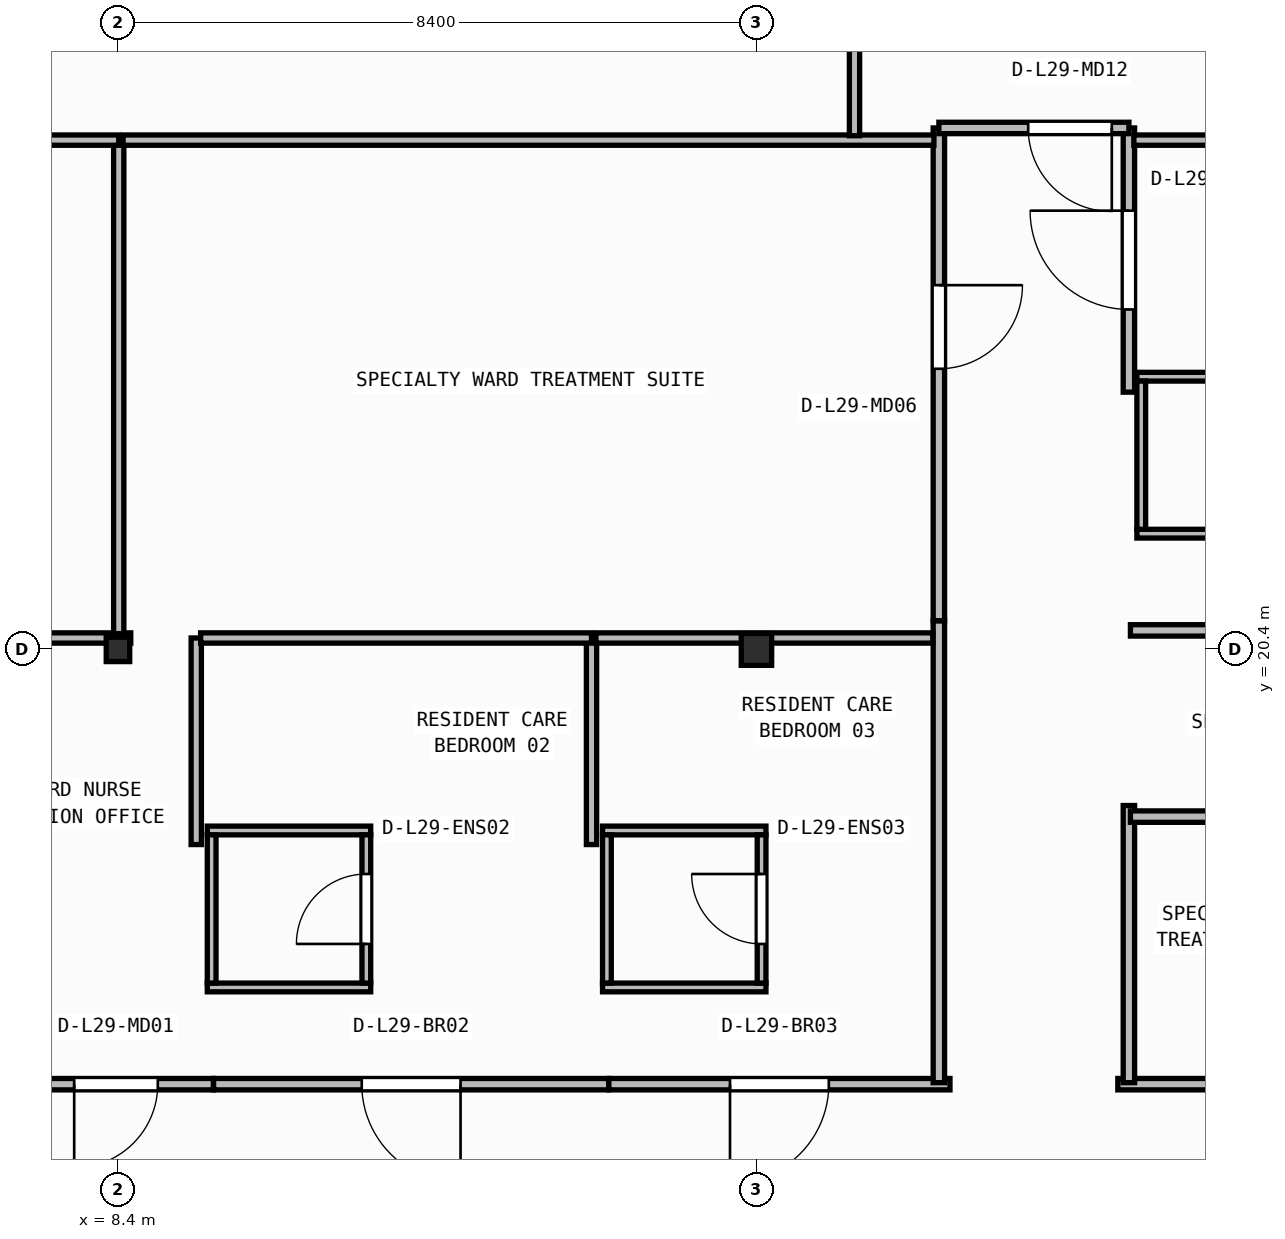
"""IFC4 building model, lengths in metres.
Left out: names, types, materials, properties, quantities, classifications, styles, units other than length and angle.
Written with IfcOpenShell. Run it as: python <this file> out.ifc"""

import sys

from ifc_helpers import new_model, si_unit, direction, frame, frame_2d, origin, origin_2d, place, context, subcontext, project, spatial, rectangle, i_section, extrude, element, fill, save


model = new_model("IFC4")
c1 = context("Model", 3, precision=1e-05, world=origin(), true_north=direction((0.0, 1.0)))
c2 = subcontext(c1, "Body", "Model", "MODEL_VIEW")
j1 = project(units=[si_unit("LENGTHUNIT", "METRE"), si_unit("PLANEANGLEUNIT", "RADIAN")], contexts=[c1])
p1 = place(None, origin())
s1 = spatial("IfcSite", under=j1, at=p1, CompositionType="ELEMENT")
p2 = place(p1, origin())
s2 = spatial("IfcBuilding", under=s1, at=p2, CompositionType="ELEMENT")
p3 = place(p2, frame((0.0, 0.0, 119.15)))
s3 = spatial("IfcBuildingStorey", under=s2, at=p3, CompositionType="ELEMENT", Elevation=119.15)
p4 = place(p3, frame((8.4, 20.4, 0.0), z_axis=(0.0, 0.0, 1.0), x_axis=(1.0, 0.0, 0.0)))
e1 = element("IfcColumn", 1, at=p4, inside=s3, PredefinedType="COLUMN", context=c2, shape_type="SweptSolid", body=[
    extrude(i_section(OverallWidth=0.309, OverallDepth=0.321, WebThickness=0.014, FlangeThickness=0.022, FilletRadius=0.017, at=origin_2d()), origin(), (0.0, 0.0, 1.0), 3.95),
])
p5 = place(p3, frame((16.8, 20.4, 0.0), z_axis=(0.0, 0.0, 1.0), x_axis=(1.0, 0.0, 0.0)))
e2 = element("IfcColumn", 2, at=p5, inside=s3, PredefinedType="COLUMN", context=c2, shape_type="SweptSolid", body=[
    extrude(i_section(OverallWidth=0.4, OverallDepth=0.42, WebThickness=0.025, FlangeThickness=0.04, at=origin_2d()), origin(), (0.0, 0.0, 1.0), 3.95),
])
for number, where, z_axis, x_axis in (
    (3, (9.575, 15.952, 0.0), (0.0, 0.0, 1.0), (1.0, 0.0, 0.0)),
    (4, (9.575, 18.018, 0.0), (0.0, 0.0, 1.0), (1.0, 0.0, 0.0)),
):
    element("IfcWall", number, at=place(p3, frame(where, z_axis=z_axis, x_axis=x_axis)), inside=s3, PredefinedType="PARTITIONING", context=c2, shape_type="SweptSolid", body=[
        extrude(rectangle(XDim=2.15, YDim=0.115, at=frame_2d((1.075, 0.0))), origin(), (0.0, 0.0, 1.0), 3.71),
    ])
p6 = place(p3, frame((9.633, 16.01, 0.0), z_axis=(0.0, 0.0, 1.0), x_axis=(0.0, 1.0, 0.0)))
e5 = element("IfcWall", 5, at=p6, inside=s3, PredefinedType="PARTITIONING", context=c2, shape_type="SweptSolid", body=[
    extrude(rectangle(XDim=1.95, YDim=0.115, at=frame_2d((0.975, 0.0))), origin(), (0.0, 0.0, 1.0), 3.71),
])
p7 = place(p3, frame((11.667, 16.01, 0.0), z_axis=(0.0, 0.0, 1.0), x_axis=(0.0, 1.0, 0.0)))
e6 = element("IfcWall", 6, at=p7, inside=s3, PredefinedType="PARTITIONING", context=c2, shape_type="SweptSolid", body=[
    extrude(rectangle(XDim=1.95, YDim=0.115, at=frame_2d((0.975, 0.0))), origin(), (0.0, 0.0, 1.0), 3.71),
])
p8 = place(p7, frame((0.515, 0.0, 0.0)))
e7 = element("IfcOpeningElement", 7, at=p8, cuts=e6, PredefinedType="OPENING", context=c2, shape_type="SweptSolid", body=[
    extrude(rectangle(XDim=0.92, YDim=2.1, at=frame_2d((0.46, 1.05))), frame((0.0, 0.067, 0.0), z_axis=(0.0, -1.0, 0.0), x_axis=(1.0, 0.0, 0.0)), (0.0, 0.0, 1.0), 0.135),
])
for number, where, z_axis, x_axis in (
    (8, (14.775, 15.952, 0.0), (0.0, 0.0, 1.0), (1.0, 0.0, 0.0)),
    (9, (14.775, 18.018, 0.0), (0.0, 0.0, 1.0), (1.0, 0.0, 0.0)),
):
    element("IfcWall", number, at=place(p3, frame(where, z_axis=z_axis, x_axis=x_axis)), inside=s3, PredefinedType="PARTITIONING", context=c2, shape_type="SweptSolid", body=[
        extrude(rectangle(XDim=2.15, YDim=0.115, at=frame_2d((1.075, 0.0))), origin(), (0.0, 0.0, 1.0), 3.71),
    ])
p9 = place(p3, frame((14.833, 16.01, 0.0), z_axis=(0.0, 0.0, 1.0), x_axis=(0.0, 1.0, 0.0)))
e10 = element("IfcWall", 10, at=p9, inside=s3, PredefinedType="PARTITIONING", context=c2, shape_type="SweptSolid", body=[
    extrude(rectangle(XDim=1.95, YDim=0.115, at=frame_2d((0.975, 0.0))), origin(), (0.0, 0.0, 1.0), 3.71),
])
p10 = place(p3, frame((16.867, 16.01, 0.0), z_axis=(0.0, 0.0, 1.0), x_axis=(0.0, 1.0, 0.0)))
e11 = element("IfcWall", 11, at=p10, inside=s3, PredefinedType="PARTITIONING", context=c2, shape_type="SweptSolid", body=[
    extrude(rectangle(XDim=1.95, YDim=0.115, at=frame_2d((0.975, 0.0))), origin(), (0.0, 0.0, 1.0), 3.71),
])
p11 = place(p10, frame((0.515, 0.0, 0.0)))
e12 = element("IfcOpeningElement", 12, at=p11, cuts=e11, PredefinedType="OPENING", context=c2, shape_type="SweptSolid", body=[
    extrude(rectangle(XDim=0.92, YDim=2.1, at=frame_2d((0.46, 1.05))), frame((0.0, 0.067, 0.0), z_axis=(0.0, -1.0, 0.0), x_axis=(1.0, 0.0, 0.0)), (0.0, 0.0, 1.0), 0.135),
])
for number, where, z_axis, x_axis in (
    (13, (21.805, 21.923, 0.0), (0.0, 0.0, 1.0), (1.0, 0.0, 0.0)),
    (14, (21.805, 23.988, 0.0), (0.0, 0.0, 1.0), (1.0, 0.0, 0.0)),
):
    element("IfcWall", number, at=place(p3, frame(where, z_axis=z_axis, x_axis=x_axis)), inside=s3, PredefinedType="PARTITIONING", context=c2, shape_type="SweptSolid", body=[
        extrude(rectangle(XDim=2.15, YDim=0.115, at=frame_2d((1.075, 0.0))), origin(), (0.0, 0.0, 1.0), 3.71),
    ])
p12 = place(p3, frame((21.863, 21.98, 0.0), z_axis=(0.0, 0.0, 1.0), x_axis=(0.0, 1.0, 0.0)))
e15 = element("IfcWall", 15, at=p12, inside=s3, PredefinedType="PARTITIONING", context=c2, shape_type="SweptSolid", body=[
    extrude(rectangle(XDim=1.95, YDim=0.115, at=frame_2d((0.975, 0.0))), origin(), (0.0, 0.0, 1.0), 3.71),
])
p13 = place(p3, frame((9.656, 14.68, 0.0), z_axis=(0.0, 0.0, 1.0), x_axis=(-1.0, 0.0, 0.0)))
e16 = element("IfcWall", 16, at=p13, inside=s3, PredefinedType="PARTITIONING", context=c2, shape_type="SweptSolid", body=[
    extrude(rectangle(XDim=2.564, YDim=0.15, at=frame_2d((1.282, 0.0))), origin(), (0.0, 0.0, 1.0), 3.71),
])
p14 = place(p13, frame((0.732, 0.0, 0.0)))
e17 = element("IfcOpeningElement", 17, at=p14, cuts=e16, PredefinedType="OPENING", context=c2, shape_type="SweptSolid", body=[
    extrude(rectangle(XDim=1.1, YDim=2.1, at=frame_2d((0.55, 1.05))), frame((0.0, 0.085, 0.0), z_axis=(0.0, -1.0, 0.0), x_axis=(1.0, 0.0, 0.0)), (0.0, 0.0, 1.0), 0.17),
])
p15 = place(p3, frame((14.856, 14.68, 0.0), z_axis=(0.0, 0.0, 1.0), x_axis=(-1.0, 0.0, 0.0)))
e18 = element("IfcWall", 18, at=p15, inside=s3, PredefinedType="PARTITIONING", context=c2, shape_type="SweptSolid", body=[
    extrude(rectangle(XDim=5.198, YDim=0.15, at=frame_2d((2.599, 0.0))), origin(), (0.0, 0.0, 1.0), 3.71),
])
p16 = place(p15, frame((1.949, 0.0, 0.0)))
e19 = element("IfcOpeningElement", 19, at=p16, cuts=e18, PredefinedType="OPENING", context=c2, shape_type="SweptSolid", body=[
    extrude(rectangle(XDim=1.3, YDim=2.15, at=frame_2d((0.65, 1.075))), frame((0.0, 0.085, 0.0), z_axis=(0.0, -1.0, 0.0), x_axis=(1.0, 0.0, 0.0)), (0.0, 0.0, 1.0), 0.17),
])
p17 = place(p3, frame((19.346, 14.68, 0.0), z_axis=(0.0, 0.0, 1.0), x_axis=(-1.0, 0.0, 0.0)))
e20 = element("IfcWall", 20, at=p17, inside=s3, PredefinedType="PARTITIONING", context=c2, shape_type="SweptSolid", body=[
    extrude(rectangle(XDim=4.488, YDim=0.15, at=frame_2d((2.244, 0.0))), origin(), (0.0, 0.0, 1.0), 3.71),
])
p18 = place(p17, frame((1.594, 0.0, 0.0)))
e21 = element("IfcOpeningElement", 21, at=p18, cuts=e20, PredefinedType="OPENING", context=c2, shape_type="SweptSolid", body=[
    extrude(rectangle(XDim=1.3, YDim=2.15, at=frame_2d((0.65, 1.075))), frame((0.0, 0.085, 0.0), z_axis=(0.0, -1.0, 0.0), x_axis=(1.0, 0.0, 0.0)), (0.0, 0.0, 1.0), 0.17),
])
p19 = place(p3, frame((29.806, 14.68, 0.0), z_axis=(0.0, 0.0, 1.0), x_axis=(-1.0, 0.0, 0.0)))
e22 = element("IfcWall", 22, at=p19, inside=s3, PredefinedType="PARTITIONING", context=c2, shape_type="SweptSolid", body=[
    extrude(rectangle(XDim=8.252, YDim=0.15, at=frame_2d((4.126, 0.0))), origin(), (0.0, 0.0, 1.0), 3.71),
])
p20 = place(p19, frame((3.576, 0.0, 0.0)))
e23 = element("IfcOpeningElement", 23, at=p20, cuts=e22, PredefinedType="OPENING", context=c2, shape_type="SweptSolid", body=[
    extrude(rectangle(XDim=1.1, YDim=2.1, at=frame_2d((0.55, 1.05))), frame((0.0, 0.085, 0.0), z_axis=(0.0, -1.0, 0.0), x_axis=(1.0, 0.0, 0.0)), (0.0, 0.0, 1.0), 0.17),
])
p21 = place(p3, frame((19.2, 20.776, 0.0), z_axis=(0.0, 0.0, 1.0), x_axis=(0.0, -1.0, 0.0)))
e24 = element("IfcWall", 24, at=p21, inside=s3, PredefinedType="PARTITIONING", context=c2, shape_type="SweptSolid", body=[
    extrude(rectangle(XDim=6.076, YDim=0.15, at=frame_2d((3.038, 0.0))), origin(), (0.0, 0.0, 1.0), 3.71),
])
p22 = place(p3, frame((21.7, 14.7, 0.0), z_axis=(0.0, 0.0, 1.0), x_axis=(0.0, 1.0, 0.0)))
e25 = element("IfcWall", 25, at=p22, inside=s3, PredefinedType="PARTITIONING", context=c2, shape_type="SweptSolid", body=[
    extrude(rectangle(XDim=3.646, YDim=0.15, at=frame_2d((1.823, 0.0))), origin(), (0.0, 0.0, 1.0), 3.71),
])
p23 = place(p3, frame((19.2, 27.26, 0.0), z_axis=(0.0, 0.0, 1.0), x_axis=(0.0, -1.0, 0.0)))
e26 = element("IfcWall", 26, at=p23, inside=s3, PredefinedType="PARTITIONING", context=c2, shape_type="SweptSolid", body=[
    extrude(rectangle(XDim=6.482, YDim=0.15, at=frame_2d((3.241, 0.0))), origin(), (0.0, 0.0, 1.0), 3.71),
])
p24 = place(p23, frame((2.068, 0.0, 0.0)))
e27 = element("IfcOpeningElement", 27, at=p24, cuts=e26, PredefinedType="OPENING", context=c2, shape_type="SweptSolid", body=[
    extrude(rectangle(XDim=1.1, YDim=2.1, at=frame_2d((0.55, 1.05))), frame((0.0, 0.085, 0.0), z_axis=(0.0, -1.0, 0.0), x_axis=(1.0, 0.0, 0.0)), (0.0, 0.0, 1.0), 0.17),
])
p25 = place(p3, frame((21.7, 23.784, 0.0), z_axis=(0.0, 0.0, 1.0), x_axis=(0.0, 1.0, 0.0)))
e28 = element("IfcWall", 28, at=p25, inside=s3, PredefinedType="PARTITIONING", context=c2, shape_type="SweptSolid", body=[
    extrude(rectangle(XDim=3.476, YDim=0.15, at=frame_2d((1.738, 0.0))), origin(), (0.0, 0.0, 1.0), 3.71),
])
p26 = place(p25, frame((1.088, 0.0, 0.0)))
e29 = element("IfcOpeningElement", 29, at=p26, cuts=e28, PredefinedType="OPENING", context=c2, shape_type="SweptSolid", body=[
    extrude(rectangle(XDim=1.3, YDim=2.15, at=frame_2d((0.65, 1.075))), frame((0.0, 0.085, 0.0), z_axis=(0.0, -1.0, 0.0), x_axis=(1.0, 0.0, 0.0)), (0.0, 0.0, 1.0), 0.17),
])
p27 = place(p3, frame((21.7, 27.26, 0.0), z_axis=(0.0, 0.0, 1.0), x_axis=(-1.0, 0.0, 0.0)))
e30 = element("IfcWall", 30, at=p27, inside=s3, PredefinedType="PARTITIONING", context=c2, shape_type="SweptSolid", body=[
    extrude(rectangle(XDim=2.5, YDim=0.15, at=frame_2d((1.25, 0.0))), origin(), (0.0, 0.0, 1.0), 3.71),
])
p28 = place(p27, frame((0.225, 0.0, 0.0)))
e31 = element("IfcOpeningElement", 31, at=p28, cuts=e30, PredefinedType="OPENING", context=c2, shape_type="SweptSolid", body=[
    extrude(rectangle(XDim=1.1, YDim=2.1, at=frame_2d((0.55, 1.05))), frame((0.0, 0.085, 0.0), z_axis=(0.0, -1.0, 0.0), x_axis=(1.0, 0.0, 0.0)), (0.0, 0.0, 1.0), 0.17),
])
p29 = place(p3, frame((21.72, 18.2, 0.0), z_axis=(0.0, 0.0, 1.0), x_axis=(1.0, 0.0, 0.0)))
e32 = element("IfcWall", 32, at=p29, inside=s3, PredefinedType="PARTITIONING", context=c2, shape_type="SweptSolid", body=[
    extrude(rectangle(XDim=8.086, YDim=0.15, at=frame_2d((4.043, 0.0))), origin(), (0.0, 0.0, 1.0), 3.71),
])
p30 = place(p3, frame((26.566, 20.65, 0.0), z_axis=(0.0, 0.0, 1.0), x_axis=(-1.0, 0.0, 0.0)))
e33 = element("IfcWall", 33, at=p30, inside=s3, PredefinedType="PARTITIONING", context=c2, shape_type="SweptSolid", body=[
    extrude(rectangle(XDim=4.846, YDim=0.15, at=frame_2d((2.423, 0.0))), origin(), (0.0, 0.0, 1.0), 3.083),
])
p31 = place(p3, frame((9.43, 17.833, 0.0), z_axis=(0.0, 0.0, 1.0), x_axis=(0.0, 1.0, 0.0)))
e34 = element("IfcWall", 34, at=p31, inside=s3, PredefinedType="PARTITIONING", context=c2, shape_type="SweptSolid", body=[
    extrude(rectangle(XDim=2.718, YDim=0.135, at=frame_2d((1.359, 0.0))), origin(), (0.0, 0.0, 1.0), 3.71),
])
p32 = place(p3, frame((8.568, 20.55, 0.0), z_axis=(0.0, 0.0, 1.0), x_axis=(-1.0, 0.0, 0.0)))
e35 = element("IfcWall", 35, at=p32, inside=s3, PredefinedType="PARTITIONING", context=c2, shape_type="SweptSolid", body=[
    extrude(rectangle(XDim=3.901, YDim=0.135, at=frame_2d((1.95, 0.0))), origin(), (0.0, 0.0, 1.0), 3.083),
])
p33 = place(p32, frame((2.541, 0.0, 0.0)))
e36 = element("IfcOpeningElement", 36, at=p33, cuts=e35, PredefinedType="OPENING", context=c2, shape_type="SweptSolid", body=[
    extrude(rectangle(XDim=1.1, YDim=2.1, at=frame_2d((0.55, 1.05))), frame((0.0, 0.077, 0.0), z_axis=(0.0, -1.0, 0.0), x_axis=(1.0, 0.0, 0.0)), (0.0, 0.0, 1.0), 0.155),
])
p34 = place(p3, frame((14.63, 17.833, 0.0), z_axis=(0.0, 0.0, 1.0), x_axis=(0.0, 1.0, 0.0)))
e37 = element("IfcWall", 37, at=p34, inside=s3, PredefinedType="PARTITIONING", context=c2, shape_type="SweptSolid", body=[
    extrude(rectangle(XDim=2.718, YDim=0.135, at=frame_2d((1.359, 0.0))), origin(), (0.0, 0.0, 1.0), 3.71),
])
p35 = place(p3, frame((14.63, 20.55, 0.0), z_axis=(0.0, 0.0, 1.0), x_axis=(-1.0, 0.0, 0.0)))
e38 = element("IfcWall", 38, at=p35, inside=s3, PredefinedType="PARTITIONING", context=c2, shape_type="SweptSolid", body=[
    extrude(rectangle(XDim=5.142, YDim=0.135, at=frame_2d((2.571, 0.0))), origin(), (0.0, 0.0, 1.0), 3.083),
])
p36 = place(p3, frame((19.12, 20.55, 0.0), z_axis=(0.0, 0.0, 1.0), x_axis=(-1.0, 0.0, 0.0)))
e39 = element("IfcWall", 39, at=p36, inside=s3, PredefinedType="PARTITIONING", context=c2, shape_type="SweptSolid", body=[
    extrude(rectangle(XDim=4.433, YDim=0.135, at=frame_2d((2.216, 0.0))), origin(), (0.0, 0.0, 1.0), 3.083),
])
p37 = place(p3, frame((8.41, 20.607, 0.0), z_axis=(0.0, 0.0, 1.0), x_axis=(0.0, 1.0, 0.0)))
e40 = element("IfcWall", 40, at=p37, inside=s3, PredefinedType="PARTITIONING", context=c2, shape_type="SweptSolid", body=[
    extrude(rectangle(XDim=6.493, YDim=0.135, at=frame_2d((3.246, 0.0))), origin(), (0.0, 0.0, 1.0), 3.152),
])
p38 = place(p3, frame((8.41, 27.1, 0.0), z_axis=(0.0, 0.0, 1.0), x_axis=(-1.0, 0.0, 0.0)))
e41 = element("IfcWall", 41, at=p38, inside=s3, PredefinedType="PARTITIONING", context=c2, shape_type="SweptSolid", body=[
    extrude(rectangle(XDim=8.17, YDim=0.135, at=frame_2d((4.085, 0.0))), origin(), (0.0, 0.0, 1.0), 3.71),
])
p39 = place(p38, frame((3.035, 0.0, 0.0)))
e42 = element("IfcOpeningElement", 42, at=p39, cuts=e41, PredefinedType="OPENING", context=c2, shape_type="SweptSolid", body=[
    extrude(rectangle(XDim=1.1, YDim=2.1, at=frame_2d((0.55, 1.05))), frame((0.0, 0.077, 0.0), z_axis=(0.0, -1.0, 0.0), x_axis=(1.0, 0.0, 0.0)), (0.0, 0.0, 1.0), 0.155),
])
p40 = place(p3, frame((19.135, 27.1, 0.0), z_axis=(0.0, 0.0, 1.0), x_axis=(-1.0, 0.0, 0.0)))
e43 = element("IfcWall", 43, at=p40, inside=s3, PredefinedType="PARTITIONING", context=c2, shape_type="SweptSolid", body=[
    extrude(rectangle(XDim=10.667, YDim=0.135, at=frame_2d((5.334, 0.0))), origin(), (0.0, 0.0, 1.0), 3.71),
])
p41 = place(p3, frame((26.34, 27.1, 0.0), z_axis=(0.0, 0.0, 1.0), x_axis=(-1.0, 0.0, 0.0)))
e44 = element("IfcWall", 44, at=p41, inside=s3, PredefinedType="PARTITIONING", context=c2, shape_type="SweptSolid", body=[
    extrude(rectangle(XDim=4.575, YDim=0.135, at=frame_2d((2.288, 0.0))), origin(), (0.0, 0.0, 1.0), 3.71),
])
p42 = place(p3, frame((18.09, 27.157, 0.0), z_axis=(0.0, 0.0, 1.0), x_axis=(0.0, 1.0, 0.0)))
e45 = element("IfcWall", 45, at=p42, inside=s3, PredefinedType="PARTITIONING", context=c2, shape_type="SweptSolid", body=[
    extrude(rectangle(XDim=7.181, YDim=0.135, at=frame_2d((3.59, 0.0))), origin(), (0.0, 0.0, 1.0), 3.71),
])
p43 = place(p8, origin())
e46 = element("IfcDoor", 46, at=p43, inside=s3, OperationType="SINGLE_SWING_LEFT", PredefinedType="DOOR", context=c2, shape_type="SweptSolid", body=[
    extrude(rectangle(XDim=0.92, YDim=2.1, at=frame_2d((0.46, 1.05))), frame((0.0, 0.025, 0.0), z_axis=(0.0, -1.0, 0.0), x_axis=(1.0, 0.0, 0.0)), (0.0, 0.0, 1.0), 0.05),
])
fill(e7, e46)
p44 = place(p11, origin())
e47 = element("IfcDoor", 47, at=p44, inside=s3, OperationType="SINGLE_SWING_RIGHT", PredefinedType="DOOR", context=c2, shape_type="SweptSolid", body=[
    extrude(rectangle(XDim=0.92, YDim=2.1, at=frame_2d((0.46, 1.05))), frame((0.0, 0.025, 0.0), z_axis=(0.0, -1.0, 0.0), x_axis=(1.0, 0.0, 0.0)), (0.0, 0.0, 1.0), 0.05),
])
fill(e12, e47)
p45 = place(p14, origin())
e48 = element("IfcDoor", 48, at=p45, inside=s3, OperationType="SINGLE_SWING_RIGHT", PredefinedType="DOOR", context=c2, shape_type="SweptSolid", body=[
    extrude(rectangle(XDim=1.1, YDim=2.1, at=frame_2d((0.55, 1.05))), frame((0.0, 0.025, 0.0), z_axis=(0.0, -1.0, 0.0), x_axis=(1.0, 0.0, 0.0)), (0.0, 0.0, 1.0), 0.05),
])
fill(e17, e48)
p46 = place(p16, origin())
e49 = element("IfcDoor", 49, at=p46, inside=s3, OperationType="SINGLE_SWING_LEFT", PredefinedType="DOOR", context=c2, shape_type="SweptSolid", body=[
    extrude(rectangle(XDim=1.3, YDim=2.15, at=frame_2d((0.65, 1.075))), frame((0.0, 0.025, 0.0), z_axis=(0.0, -1.0, 0.0), x_axis=(1.0, 0.0, 0.0)), (0.0, 0.0, 1.0), 0.05),
])
fill(e19, e49)
p47 = place(p18, origin())
e50 = element("IfcDoor", 50, at=p47, inside=s3, OperationType="SINGLE_SWING_RIGHT", PredefinedType="DOOR", context=c2, shape_type="SweptSolid", body=[
    extrude(rectangle(XDim=1.3, YDim=2.15, at=frame_2d((0.65, 1.075))), frame((0.0, 0.025, 0.0), z_axis=(0.0, -1.0, 0.0), x_axis=(1.0, 0.0, 0.0)), (0.0, 0.0, 1.0), 0.05),
])
fill(e21, e50)
p48 = place(p24, origin())
e51 = element("IfcDoor", 51, at=p48, inside=s3, OperationType="SINGLE_SWING_LEFT", PredefinedType="DOOR", context=c2, shape_type="SweptSolid", body=[
    extrude(rectangle(XDim=1.1, YDim=2.1, at=frame_2d((0.55, 1.05))), frame((0.0, 0.025, 0.0), z_axis=(0.0, -1.0, 0.0), x_axis=(1.0, 0.0, 0.0)), (0.0, 0.0, 1.0), 0.05),
])
fill(e27, e51)
p49 = place(p26, origin())
e52 = element("IfcDoor", 52, at=p49, inside=s3, OperationType="SINGLE_SWING_RIGHT", PredefinedType="DOOR", context=c2, shape_type="SweptSolid", body=[
    extrude(rectangle(XDim=1.3, YDim=2.15, at=frame_2d((0.65, 1.075))), frame((0.0, 0.025, 0.0), z_axis=(0.0, -1.0, 0.0), x_axis=(1.0, 0.0, 0.0)), (0.0, 0.0, 1.0), 0.05),
])
fill(e29, e52)
p50 = place(p28, origin())
e53 = element("IfcDoor", 53, at=p50, inside=s3, OperationType="SINGLE_SWING_LEFT", PredefinedType="DOOR", context=c2, shape_type="SweptSolid", body=[
    extrude(rectangle(XDim=1.1, YDim=2.1, at=frame_2d((0.55, 1.05))), frame((0.0, 0.025, 0.0), z_axis=(0.0, -1.0, 0.0), x_axis=(1.0, 0.0, 0.0)), (0.0, 0.0, 1.0), 0.05),
])
fill(e31, e53)
save(model, sys.argv[1])
